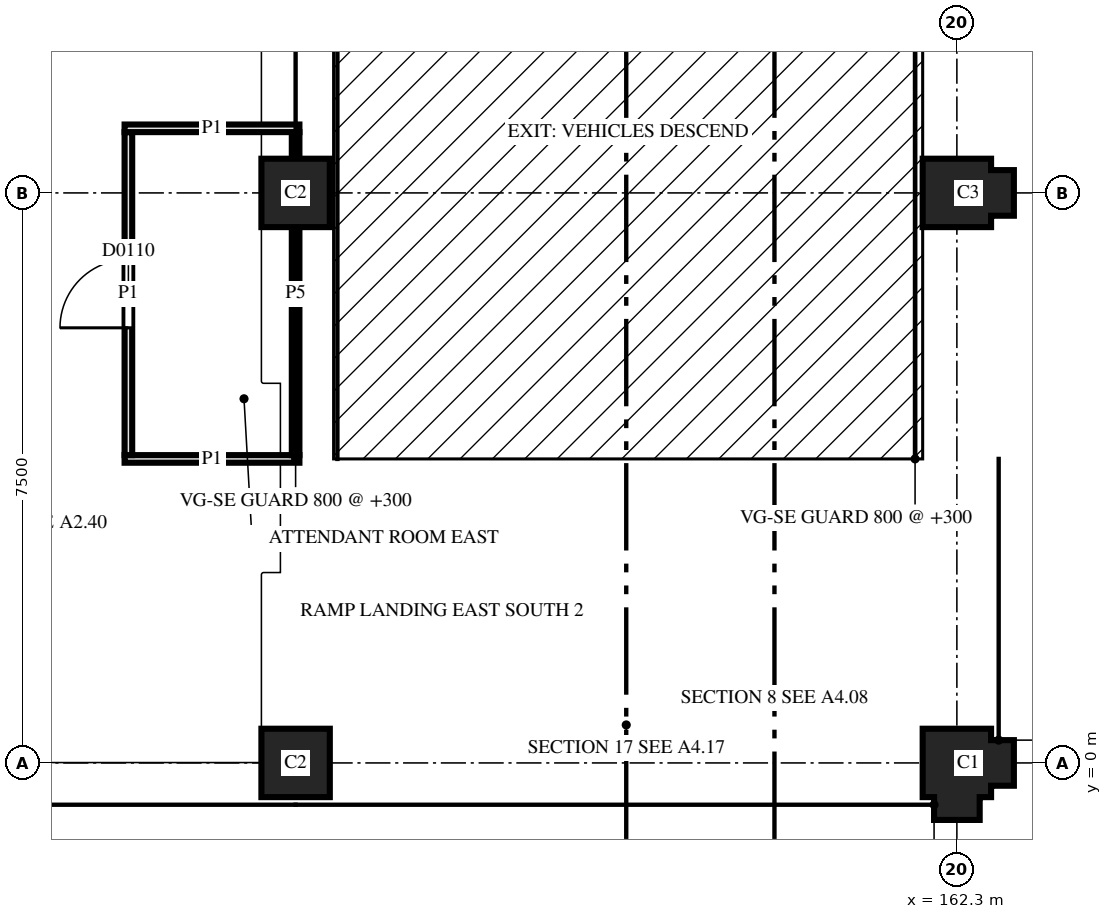
"""IFC4 building model, lengths in metres.
Left out: names, types, materials, properties, quantities, classifications, styles, units other than length and angle.
Written with IfcOpenShell. Run it as: python <this file> out.ifc"""

import sys

from ifc_helpers import new_model, si_unit, direction, frame, frame_2d, origin, place, context, subcontext, project, spatial, polyline, rectangle, outline, extrude, element, fill, save


model = new_model("IFC4")
c1 = context("Model", 3, precision=1e-05, world=origin(), true_north=direction((0.0, 1.0)))
c2 = subcontext(c1, "Body", "Model", "MODEL_VIEW")
j1 = project(units=[si_unit("LENGTHUNIT", "METRE"), si_unit("PLANEANGLEUNIT", "RADIAN")], contexts=[c1])
p1 = place(None, origin())
s1 = spatial("IfcSite", under=j1, at=p1, CompositionType="ELEMENT")
p2 = place(p1, origin())
s2 = spatial("IfcBuilding", under=s1, at=p2, CompositionType="ELEMENT")
p3 = place(p2, frame((0.0, 0.0, 4.5)))
s3 = spatial("IfcBuildingStorey", under=s2, at=p3, CompositionType="ELEMENT", Elevation=4.5)
p4 = place(p3, frame((153.6, 0.0, 0.0), z_axis=(0.0, 0.0, 1.0), x_axis=(1.0, 0.0, 0.0)))
e1 = element("IfcColumn", 1, at=p4, inside=s3, PredefinedType="COLUMN", context=c2, shape_type="SweptSolid", body=[
    extrude(outline(polyline([(-0.45, -0.45), (0.45, -0.45), (0.45, 0.45), (-0.45, 0.45), (-0.45, -0.45)])), origin(), (0.0, 0.0, 1.0), 3.7),
])
p5 = place(p3, frame((162.3, 0.0, 0.0), z_axis=(0.0, 0.0, 1.0), x_axis=(0.0, -1.0, 0.0)))
e2 = element("IfcColumn", 2, at=p5, inside=s3, PredefinedType="COLUMN", context=c2, shape_type="SweptSolid", body=[
    extrude(outline(polyline([(-0.45, -0.45), (0.45, -0.45), (0.45, -0.3), (0.75, -0.3), (0.75, 0.3), (0.45, 0.3), (0.45, 0.45), (0.3, 0.45), (0.3, 0.75), (-0.3, 0.75), (-0.3, 0.45), (-0.45, 0.45), (-0.45, -0.45)])), origin(), (0.0, 0.0, 1.0), 3.7),
])
p6 = place(p3, frame((153.6, 7.5, 0.0), z_axis=(0.0, 0.0, 1.0), x_axis=(1.0, 0.0, 0.0)))
e3 = element("IfcColumn", 3, at=p6, inside=s3, PredefinedType="COLUMN", context=c2, shape_type="SweptSolid", body=[
    extrude(outline(polyline([(-0.45, -0.45), (0.45, -0.45), (0.45, 0.45), (-0.45, 0.45), (-0.45, -0.45)])), origin(), (0.0, 0.0, 1.0), 3.7),
])
p7 = place(p3, frame((162.3, 7.5, 0.0), z_axis=(0.0, 0.0, 1.0), x_axis=(1.0, 0.0, 0.0)))
e4 = element("IfcColumn", 4, at=p7, inside=s3, PredefinedType="COLUMN", context=c2, shape_type="SweptSolid", body=[
    extrude(outline(polyline([(-0.45, -0.45), (0.45, -0.45), (0.45, -0.3), (0.75, -0.3), (0.75, 0.3), (0.45, 0.3), (0.45, 0.45), (-0.45, 0.45), (-0.45, -0.45)])), origin(), (0.0, 0.0, 1.0), 3.7),
])
p8 = place(p3, frame((151.35, 4.0, 0.0), z_axis=(0.0, 0.0, 1.0), x_axis=(1.0, 0.0, 0.0)))
e5 = element("IfcWall", 5, at=p8, inside=s3, PredefinedType="PARTITIONING", context=c2, shape_type="SweptSolid", body=[
    extrude(rectangle(XDim=2.3, YDim=0.1, at=frame_2d((1.15, 0.0))), origin(), (0.0, 0.0, 1.0), 2.88),
])
p9 = place(p3, frame((153.6, 4.05, 0.0), z_axis=(0.0, 0.0, 1.0), x_axis=(0.0, 1.0, 0.0)))
e6 = element("IfcWall", 6, at=p9, inside=s3, PredefinedType="PARTITIONING", context=c2, shape_type="SweptSolid", body=[
    extrude(rectangle(XDim=4.25, YDim=0.1, at=frame_2d((2.125, 0.0))), origin(), (0.0, 0.0, 1.0), 2.6),
])
p10 = place(p3, frame((151.4, 8.3, 0.0), z_axis=(0.0, 0.0, 1.0), x_axis=(0.0, -1.0, 0.0)))
e7 = element("IfcWall", 7, at=p10, inside=s3, PredefinedType="PARTITIONING", context=c2, shape_type="SweptSolid", body=[
    extrude(rectangle(XDim=4.25, YDim=0.1, at=frame_2d((2.125, 0.0))), origin(), (0.0, 0.0, 1.0), 2.88),
])
p11 = place(p10, frame((1.675, 0.0, 0.0)))
e8 = element("IfcOpeningElement", 8, at=p11, cuts=e7, PredefinedType="OPENING", context=c2, shape_type="SweptSolid", body=[
    extrude(rectangle(XDim=0.9, YDim=2.1, at=frame_2d((0.45, 1.05))), frame((0.0, 0.06, 0.0), z_axis=(0.0, -1.0, 0.0), x_axis=(1.0, 0.0, 0.0)), (0.0, 0.0, 1.0), 0.12),
])
p12 = place(p3, frame((153.65, 8.35, 0.0), z_axis=(0.0, 0.0, 1.0), x_axis=(-1.0, 0.0, 0.0)))
e9 = element("IfcWall", 9, at=p12, inside=s3, PredefinedType="PARTITIONING", context=c2, shape_type="SweptSolid", body=[
    extrude(rectangle(XDim=2.3, YDim=0.1, at=frame_2d((1.15, 0.0))), origin(), (0.0, 0.0, 1.0), 2.88),
])
p13 = place(p11, origin())
e10 = element("IfcDoor", 10, at=p13, inside=s3, OperationType="SINGLE_SWING_RIGHT", PredefinedType="DOOR", context=c2, shape_type="SweptSolid", body=[
    extrude(rectangle(XDim=0.9, YDim=2.1, at=frame_2d((0.45, 1.05))), frame((0.0, 0.025, 0.0), z_axis=(0.0, -1.0, 0.0), x_axis=(1.0, 0.0, 0.0)), (0.0, 0.0, 1.0), 0.05),
])
fill(e8, e10)
save(model, sys.argv[1])
